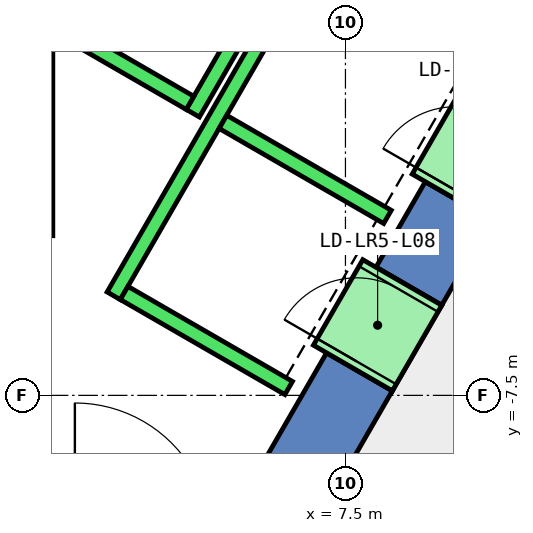
"""IFC4 building model, lengths in metres.
Left out: names, types, materials, properties, quantities, classifications, styles, units other than length and angle.
Written with IfcOpenShell. Run it as: python <this file> out.ifc"""

import sys

from ifc_helpers import new_model, si_unit, direction, frame, frame_2d, origin, place, context, subcontext, project, spatial, polyline, rectangle, outline, extrude, element, fill, save


model = new_model("IFC4")
c1 = context("Model", 3, precision=1e-05, world=origin(), true_north=direction((0.0, 1.0)))
c2 = subcontext(c1, "Body", "Model", "MODEL_VIEW")
j1 = project(units=[si_unit("LENGTHUNIT", "METRE"), si_unit("PLANEANGLEUNIT", "RADIAN")], contexts=[c1])
p1 = place(None, origin())
s1 = spatial("IfcSite", under=j1, at=p1, CompositionType="ELEMENT")
p2 = place(p1, origin())
s2 = spatial("IfcBuilding", under=s1, at=p2, CompositionType="ELEMENT")
p3 = place(p2, frame((0.0, 0.0, 43.4)))
s3 = spatial("IfcBuildingStorey", under=s2, at=p3, CompositionType="ELEMENT", Elevation=43.4)
p4 = place(p3, frame((0.0, 0.0, -0.4)))
e1 = element("IfcWall", 1, at=p4, inside=s3, PredefinedType="SHEAR", context=c2, shape_type="SweptSolid", body=[
    extrude(outline(polyline([(8.117, -7.44), (7.252, -6.94), (6.351, -8.5), (6.928, -9.5), (8.117, -7.44)])), origin(), (0.0, 0.0, 1.0), 4.2),
])
p5 = place(p3, frame((0.0, 0.0, -0.4)))
e2 = element("IfcWall", 2, at=p5, inside=s3, PredefinedType="SHEAR", context=c2, shape_type="SweptSolid", body=[
    extrude(outline(polyline([(9.417, -5.189), (8.551, -4.689), (7.902, -5.814), (8.767, -6.314), (9.417, -5.189)])), origin(), (0.0, 0.0, 1.0), 4.2),
])
p6 = place(p3, frame((0.0, 0.0, 3.6)))
e3 = element("IfcWall", 3, at=p6, inside=s3, PredefinedType="SHEAR", context=c2, shape_type="SweptSolid", body=[
    extrude(outline(polyline([(8.767, -6.314), (7.902, -5.814), (7.252, -6.94), (8.117, -7.44), (8.767, -6.314)])), origin(), (0.0, 0.0, 1.0), 0.2),
])
p7 = place(p3, frame((0.0, 0.0, 3.6)))
e4 = element("IfcWall", 4, at=p7, inside=s3, PredefinedType="SHEAR", context=c2, shape_type="SweptSolid", body=[
    extrude(outline(polyline([(10.067, -4.063), (9.201, -3.563), (8.551, -4.689), (9.417, -5.189), (10.067, -4.063)])), origin(), (0.0, 0.0, 1.0), 0.2),
])
p8 = place(p3, frame((12.401, -7.621, 0.0), z_axis=(0.0, 0.0, 1.0), x_axis=(-0.499983724212, -0.866034800411, 0.0)))
e5 = element("IfcWall", 5, at=p8, inside=s3, PredefinedType="PARTITIONING", context=c2, shape_type="SweptSolid", body=[
    extrude(rectangle(XDim=9.302, YDim=0.2, at=frame_2d((4.651, 0.0))), origin(), (0.0, 0.0, 1.0), 3.8),
])
p9 = place(p8, frame((1.429, 0.0, 0.0)))
e6 = element("IfcOpeningElement", 6, at=p9, cuts=e5, PredefinedType="OPENING", context=c2, shape_type="SweptSolid", body=[
    extrude(rectangle(XDim=1.0, YDim=2.1, at=frame_2d((0.5, 1.05))), frame((0.0, 0.11, 0.0), z_axis=(0.0, -1.0, 0.0), x_axis=(1.0, 0.0, 0.0)), (0.0, 0.0, 1.0), 0.22),
])
p10 = place(p8, frame((2.529, 0.0, 0.0)))
e7 = element("IfcOpeningElement", 7, at=p10, cuts=e5, PredefinedType="OPENING", context=c2, shape_type="SweptSolid", body=[
    extrude(rectangle(XDim=1.0, YDim=2.1, at=frame_2d((0.5, 1.05))), frame((0.0, 0.11, 0.0), z_axis=(0.0, -1.0, 0.0), x_axis=(1.0, 0.0, 0.0)), (0.0, 0.0, 1.0), 0.22),
])
p11 = place(p3, frame((5.492, -3.788, 0.0), z_axis=(0.0, 0.0, 1.0), x_axis=(0.500011755427, 0.866018616679, 0.0)))
e8 = element("IfcWall", 8, at=p11, inside=s3, PredefinedType="STANDARD", context=c2, shape_type="SweptSolid", body=[
    extrude(rectangle(XDim=2.8, YDim=0.2, at=frame_2d((1.4, 0.0))), origin(), (0.0, 0.0, 1.0), 3.8),
])
p12 = place(p3, frame((3.377, -2.452, 0.0), z_axis=(0.0, 0.0, 1.0), x_axis=(0.865955154139, -0.50012165622, 0.0)))
e9 = element("IfcWall", 9, at=p12, inside=s3, PredefinedType="STANDARD", context=c2, shape_type="SweptSolid", body=[
    extrude(rectangle(XDim=2.4, YDim=0.2, at=frame_2d((1.2, 0.0))), origin(), (0.0, 0.0, 1.0), 3.8),
])
p13 = place(p3, frame((4.451, -6.19, 0.0), z_axis=(0.0, 0.0, 1.0), x_axis=(0.50000090737, 0.866024879913, 0.0)))
e10 = element("IfcWall", 10, at=p13, inside=s3, PredefinedType="STANDARD", context=c2, shape_type="SweptSolid", body=[
    extrude(rectangle(XDim=10.6, YDim=0.2, at=frame_2d((5.3, 0.0))), origin(), (0.0, 0.0, 1.0), 3.8),
])
for number, where, z_axis, x_axis in (
    (11, (4.588, -6.153, 0.0), (0.0, 0.0, 1.0), (0.866, -0.5, 0.0)),
    (12, (5.888, -3.902, 0.0), (0.0, 0.0, 1.0), (0.866, -0.5, 0.0)),
):
    element("IfcWall", number, at=place(p3, frame(where, z_axis=z_axis, x_axis=x_axis)), inside=s3, PredefinedType="STANDARD", context=c2, shape_type="SweptSolid", body=[
        extrude(rectangle(XDim=2.5, YDim=0.2, at=frame_2d((1.25, 0.0))), origin(), (0.0, 0.0, 1.0), 3.8),
    ])
p14 = place(p3, frame((7.598, -7.14, 0.0), z_axis=(0.0, 0.0, 1.0), x_axis=(0.500362116554, 0.865816234728, 0.0)))
e13 = element("IfcWall", 13, at=p14, inside=s3, PredefinedType="STANDARD", context=c2, shape_type="SweptSolid", body=[
    extrude(rectangle(XDim=1.299, YDim=1.2, at=frame_2d((0.65, 0.0))), origin(), (0.0, 0.0, 1.0), 2.4),
])
p15 = place(p14, frame((0.1, 0.0, 0.0)))
e14 = element("IfcOpeningElement", 14, at=p15, cuts=e13, PredefinedType="OPENING", context=c2, shape_type="SweptSolid", body=[
    extrude(rectangle(XDim=1.1, YDim=2.3, at=frame_2d((0.55, 1.15))), frame((0.0, 0.61, 0.0), z_axis=(0.0, -1.0, 0.0), x_axis=(1.0, 0.0, 0.0)), (0.0, 0.0, 1.0), 1.22),
])
p16 = place(p3, frame((8.898, -4.889, 0.0), z_axis=(0.0, 0.0, 1.0), x_axis=(0.500036693733, 0.866004217611, 0.0)))
e15 = element("IfcWall", 15, at=p16, inside=s3, PredefinedType="STANDARD", context=c2, shape_type="SweptSolid", body=[
    extrude(rectangle(XDim=1.3, YDim=1.2, at=frame_2d((0.65, 0.0))), origin(), (0.0, 0.0, 1.0), 2.4),
])
p17 = place(p16, frame((0.1, 0.0, 0.0)))
e16 = element("IfcOpeningElement", 16, at=p17, cuts=e15, PredefinedType="OPENING", context=c2, shape_type="SweptSolid", body=[
    extrude(rectangle(XDim=1.1, YDim=2.3, at=frame_2d((0.55, 1.15))), frame((0.0, 0.61, 0.0), z_axis=(0.0, -1.0, 0.0), x_axis=(1.0, 0.0, 0.0)), (0.0, 0.0, 1.0), 1.22),
])
p18 = place(p3, frame((3.55, -2.667, 0.0), z_axis=(0.0, 0.0, 1.0), x_axis=(0.0, -1.0, 0.0)))
e17 = element("IfcWall", 17, at=p18, inside=s3, PredefinedType="STANDARD", context=c2, shape_type="SweptSolid", body=[
    extrude(rectangle(XDim=2.733, YDim=0.2, at=frame_2d((1.366, 0.0))), origin(), (0.0, 0.0, 1.0), 3.8),
])
p19 = place(p15, origin())
e18 = element("IfcDoor", 18, at=p19, inside=s3, OperationType="SLIDING_TO_LEFT", PredefinedType="DOOR", context=c2, shape_type="SweptSolid", body=[
    extrude(rectangle(XDim=1.1, YDim=2.3, at=frame_2d((0.55, 1.15))), frame((0.0, 0.025, 0.0), z_axis=(0.0, -1.0, 0.0), x_axis=(1.0, 0.0, 0.0)), (0.0, 0.0, 1.0), 0.05),
])
fill(e14, e18)
save(model, sys.argv[1])
